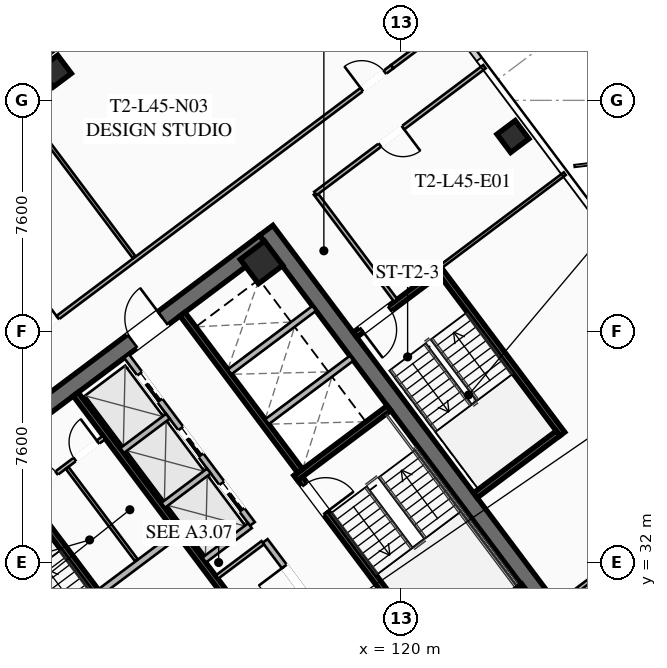
"""IFC4 building model, lengths in metres.
Left out: names, types, materials, properties, quantities, classifications, styles, units other than length and angle.
Written with IfcOpenShell. Run it as: python <this file> out.ifc"""

import sys

from ifc_helpers import new_model, si_unit, direction, frame, frame_2d, origin, origin_2d, place, context, subcontext, project, spatial, rectangle, hollow_rectangle, extrude, element, fill, save


model = new_model("IFC4")
c1 = context("Model", 3, precision=1e-05, world=origin(), true_north=direction((0.0, 1.0)))
c2 = subcontext(c1, "Body", "Model", "MODEL_VIEW")
j1 = project(units=[si_unit("LENGTHUNIT", "METRE"), si_unit("PLANEANGLEUNIT", "RADIAN")], contexts=[c1])
p1 = place(None, origin())
s1 = spatial("IfcSite", under=j1, at=p1, CompositionType="ELEMENT")
p2 = place(p1, origin())
s2 = spatial("IfcBuilding", under=s1, at=p2, CompositionType="ELEMENT")
p3 = place(p2, frame((0.0, 0.0, 167.65)))
s3 = spatial("IfcBuildingStorey", under=s2, at=p3, CompositionType="ELEMENT", Elevation=167.65)
for number, where, z_axis, x_axis in (
    (1, (112.436, 21.077, 0.0), (0.0, 0.0, 1.0), (-0.6, 0.8, 0.0)),
    (2, (115.564, 42.923, 0.0), (0.0, 0.0, 1.0), (0.6, -0.8, 0.0)),
):
    element("IfcWall", number, at=place(p3, frame(where, z_axis=z_axis, x_axis=x_axis)), inside=s3, PredefinedType="SHEAR", context=c2, shape_type="SweptSolid", body=[
        extrude(rectangle(XDim=15.6, YDim=0.55, at=frame_2d((7.8, 0.0))), origin(), (0.0, 0.0, 1.0), 3.55),
    ])
p4 = place(p3, frame((103.461, 33.502, 0.0), z_axis=(0.0, 0.0, 1.0), x_axis=(0.799998054672, 0.600002593761, 0.0)))
e3 = element("IfcWall", 3, at=p4, inside=s3, PredefinedType="SHEAR", context=c2, shape_type="SweptSolid", body=[
    extrude(rectangle(XDim=15.06, YDim=0.55, at=frame_2d((7.53, 0.0))), origin(), (0.0, 0.0, 1.0), 3.55),
])
p5 = place(p4, frame((4.58, 0.0, 0.0)))
e4 = element("IfcOpeningElement", 4, at=p5, cuts=e3, PredefinedType="OPENING", context=c2, shape_type="SweptSolid", body=[
    extrude(rectangle(XDim=1.25, YDim=2.25, at=frame_2d((0.625, 1.125))), frame((0.0, 0.285, 0.0), z_axis=(0.0, -1.0, 0.0), x_axis=(1.0, 0.0, 0.0)), (0.0, 0.0, 1.0), 0.57),
])
p6 = place(p4, frame((9.63, 0.0, 0.0)))
e5 = element("IfcOpeningElement", 5, at=p6, cuts=e3, PredefinedType="OPENING", context=c2, shape_type="SweptSolid", body=[
    extrude(rectangle(XDim=1.25, YDim=2.25, at=frame_2d((0.625, 1.125))), frame((0.0, 0.285, 0.0), z_axis=(0.0, -1.0, 0.0), x_axis=(1.0, 0.0, 0.0)), (0.0, 0.0, 1.0), 0.57),
])
for number, where, z_axis, x_axis in (
    (6, (123.87, 30.59, 0.0), (0.0, 0.0, 1.0), (0.8, 0.6, 0.0)),
    (7, (115.41, 41.87, 0.0), (0.0, 0.0, 1.0), (0.8, 0.6, 0.0)),
):
    element("IfcColumn", number, at=place(p3, frame(where, z_axis=z_axis, x_axis=x_axis)), inside=s3, PredefinedType="COLUMN", context=c2, shape_type="SweptSolid", body=[
        extrude(hollow_rectangle(XDim=1.0, YDim=1.0, WallThickness=0.04, at=origin_2d()), origin(), (0.0, 0.0, 1.0), 3.37),
    ])
for number, where, z_axis, x_axis in (
    (8, (123.68, 46.01, 0.0), (0.0, 0.0, 1.0), (0.8, 0.6, 0.0)),
    (9, (108.63, 48.16, 0.0), (0.0, 0.0, 1.0), (0.8, 0.6, 0.0)),
):
    element("IfcColumn", number, at=place(p3, frame(where, z_axis=z_axis, x_axis=x_axis)), inside=s3, PredefinedType="COLUMN", context=c2, shape_type="SweptSolid", body=[
        extrude(hollow_rectangle(XDim=0.75, YDim=0.75, WallThickness=0.032, at=origin_2d()), origin(), (0.0, 0.0, 1.0), 3.37),
    ])
p7 = place(p3, frame((111.44, 29.08, 0.0), z_axis=(0.0, 0.0, 1.0), x_axis=(-0.59999029481, 0.8000072788, 0.0)))
e10 = element("IfcWall", 10, at=p7, inside=s3, PredefinedType="SHEAR", context=c2, shape_type="SweptSolid", body=[
    extrude(rectangle(XDim=8.05, YDim=0.2, at=frame_2d((4.025, 0.0))), origin(), (0.0, 0.0, 1.0), 3.37),
])
p8 = place(p7, frame((0.45, 0.0, 0.0)))
e11 = element("IfcOpeningElement", 11, at=p8, cuts=e10, PredefinedType="OPENING", context=c2, shape_type="SweptSolid", body=[
    extrude(rectangle(XDim=1.15, YDim=2.2, at=frame_2d((0.575, 1.1))), frame((0.0, 0.11, 0.0), z_axis=(0.0, -1.0, 0.0), x_axis=(1.0, 0.0, 0.0)), (0.0, 0.0, 1.0), 0.22),
])
p9 = place(p3, frame((116.56, 34.92, 0.0), z_axis=(0.0, 0.0, 1.0), x_axis=(0.59999029481, -0.8000072788, 0.0)))
e12 = element("IfcWall", 12, at=p9, inside=s3, PredefinedType="SHEAR", context=c2, shape_type="SweptSolid", body=[
    extrude(rectangle(XDim=8.05, YDim=0.2, at=frame_2d((4.025, 0.0))), origin(), (0.0, 0.0, 1.0), 3.37),
])
p10 = place(p9, frame((0.45, 0.0, 0.0)))
e13 = element("IfcOpeningElement", 13, at=p10, cuts=e12, PredefinedType="OPENING", context=c2, shape_type="SweptSolid", body=[
    extrude(rectangle(XDim=1.15, YDim=2.2, at=frame_2d((0.575, 1.1))), frame((0.0, 0.11, 0.0), z_axis=(0.0, -1.0, 0.0), x_axis=(1.0, 0.0, 0.0)), (0.0, 0.0, 1.0), 0.22),
])
for number, where, z_axis, x_axis in (
    (14, (116.54, 34.78, 0.0), (0.0, 0.0, 1.0), (0.8, 0.6, 0.0)),
    (15, (120.98, 28.86, 0.0), (0.0, 0.0, 1.0), (0.8, 0.6, 0.0)),
):
    element("IfcWall", number, at=place(p3, frame(where, z_axis=z_axis, x_axis=x_axis)), inside=s3, PredefinedType="SHEAR", context=c2, shape_type="SweptSolid", body=[
        extrude(rectangle(XDim=3.83, YDim=0.2, at=frame_2d((1.915, 0.0))), origin(), (0.0, 0.0, 1.0), 3.37),
    ])
p11 = place(p3, frame((117.998, 25.936, 0.0), z_axis=(0.0, 0.0, 1.0), x_axis=(-0.600002693989, 0.799997979501, 0.0)))
e16 = element("IfcWall", 16, at=p11, inside=s3, PredefinedType="SHEAR", context=c2, shape_type="SweptSolid", body=[
    extrude(rectangle(XDim=14.5, YDim=0.2, at=frame_2d((7.25, 0.0))), origin(), (0.0, 0.0, 1.0), 3.37),
])
p12 = place(p3, frame((110.104, 31.028, 0.0), z_axis=(0.0, 0.0, 1.0), x_axis=(0.800018601094, 0.59997519774, 0.0)))
e17 = element("IfcWall", 17, at=p12, inside=s3, PredefinedType="SOLIDWALL", context=c2, shape_type="SweptSolid", body=[
    extrude(rectangle(XDim=3.15, YDim=0.22, at=frame_2d((1.575, 0.0))), origin(), (0.0, 0.0, 1.0), 2.723),
])
p13 = place(p3, frame((112.81, 40.17, 0.0), z_axis=(0.0, 0.0, 1.0), x_axis=(0.599993943644, -0.800004542231, 0.0)))
e18 = element("IfcWall", 18, at=p13, inside=s3, PredefinedType="SHEAR", context=c2, shape_type="SweptSolid", body=[
    extrude(rectangle(XDim=6.45, YDim=0.2, at=frame_2d((3.225, 0.0))), origin(), (0.0, 0.0, 1.0), 3.37),
])
for number, where, z_axis, x_axis in (
    (19, (115.59, 36.63, 0.0), (0.0, 0.0, 1.0), (0.8, 0.6, 0.0)),
    (20, (114.36, 38.27, 0.0), (0.0, 0.0, 1.0), (0.8, 0.6, 0.0)),
):
    element("IfcWall", number, at=place(p3, frame(where, z_axis=z_axis, x_axis=x_axis)), inside=s3, PredefinedType="SOLIDWALL", context=c2, shape_type="SweptSolid", body=[
        extrude(rectangle(XDim=3.48, YDim=0.2, at=frame_2d((1.74, 0.0))), origin(), (0.0, 0.0, 1.0), 3.37),
    ])
p14 = place(p3, frame((107.71, 34.22, 0.0), z_axis=(0.0, 0.0, 1.0), x_axis=(0.799981399002, 0.60002480053, 0.0)))
e21 = element("IfcWall", 21, at=p14, inside=s3, PredefinedType="PARTITIONING", context=c2, shape_type="SweptSolid", body=[
    extrude(rectangle(XDim=3.15, YDim=0.135, at=frame_2d((1.575, 0.0))), origin(), (0.0, 0.0, 1.0), 2.723),
])
p15 = place(p14, frame((0.25, 0.0, 0.0)))
e22 = element("IfcOpeningElement", 22, at=p15, cuts=e21, PredefinedType="OPENING", context=c2, shape_type="SweptSolid", body=[
    extrude(rectangle(XDim=0.95, YDim=2.05, at=frame_2d((0.475, 1.025))), frame((0.0, 0.077, 0.0), z_axis=(0.0, -1.0, 0.0), x_axis=(1.0, 0.0, 0.0)), (0.0, 0.0, 1.0), 0.155),
])
p16 = place(p14, frame((1.95, 0.0, 0.0)))
e23 = element("IfcOpeningElement", 23, at=p16, cuts=e21, PredefinedType="OPENING", context=c2, shape_type="SweptSolid", body=[
    extrude(rectangle(XDim=0.95, YDim=2.05, at=frame_2d((0.475, 1.025))), frame((0.0, 0.077, 0.0), z_axis=(0.0, -1.0, 0.0), x_axis=(1.0, 0.0, 0.0)), (0.0, 0.0, 1.0), 0.155),
])
p17 = place(p3, frame((111.296, 32.072, 0.0), z_axis=(0.0, 0.0, 1.0), x_axis=(-0.59995887973, 0.800030838552, 0.0)))
e24 = element("IfcWall", 24, at=p17, inside=s3, PredefinedType="PARTITIONING", context=c2, shape_type="SweptSolid", body=[
    extrude(rectangle(XDim=3.8, YDim=0.11, at=frame_2d((1.9, 0.0))), origin(), (0.0, 0.0, 1.0), 2.723),
])
p18 = place(p3, frame((119.67, 27.19, 0.0), z_axis=(0.0, 0.0, 1.0), x_axis=(-0.599988677396, 0.800008491828, 0.0)))
e25 = element("IfcWall", 25, at=p18, inside=s3, PredefinedType="SOLIDWALL", context=c2, shape_type="SweptSolid", body=[
    extrude(rectangle(XDim=6.9, YDim=0.2, at=frame_2d((3.45, 0.0))), origin(), (0.0, 0.0, 1.0), 2.723),
])
p19 = place(p18, frame((0.85, 0.0, 0.0)))
e26 = element("IfcOpeningElement", 26, at=p19, cuts=e25, PredefinedType="OPENING", context=c2, shape_type="SweptSolid", body=[
    extrude(rectangle(XDim=0.95, YDim=2.05, at=frame_2d((0.475, 1.025))), frame((0.0, 0.11, 0.0), z_axis=(0.0, -1.0, 0.0), x_axis=(1.0, 0.0, 0.0)), (0.0, 0.0, 1.0), 0.22),
])
p20 = place(p18, frame((4.8, 0.0, 0.0)))
e27 = element("IfcOpeningElement", 27, at=p20, cuts=e25, PredefinedType="OPENING", context=c2, shape_type="SweptSolid", body=[
    extrude(rectangle(XDim=1.05, YDim=2.2, at=frame_2d((0.525, 1.1))), frame((0.0, 0.11, 0.0), z_axis=(0.0, -1.0, 0.0), x_axis=(1.0, 0.0, 0.0)), (0.0, 0.0, 1.0), 0.22),
])
p21 = place(p3, frame((113.946, 31.522, 0.0), z_axis=(0.0, 0.0, 1.0), x_axis=(0.8, 0.6, 0.0)))
e28 = element("IfcWall", 28, at=p21, inside=s3, PredefinedType="PARTITIONING", context=c2, shape_type="SweptSolid", body=[
    extrude(rectangle(XDim=1.88, YDim=0.135, at=frame_2d((0.94, 0.0))), origin(), (0.0, 0.0, 1.0), 2.723),
])
p22 = place(p3, frame((115.11, 33.27, 0.0), z_axis=(0.0, 0.0, 1.0), x_axis=(-0.600011322243, 0.799991508192, 0.0)))
e29 = element("IfcWall", 29, at=p22, inside=s3, PredefinedType="SOLIDWALL", context=c2, shape_type="SweptSolid", body=[
    extrude(rectangle(XDim=6.9, YDim=0.2, at=frame_2d((3.45, 0.0))), origin(), (0.0, 0.0, 1.0), 3.37),
])
p23 = place(p22, frame((0.575, 0.0, 0.0)))
e30 = element("IfcOpeningElement", 30, at=p23, cuts=e29, PredefinedType="OPENING", context=c2, shape_type="SweptSolid", body=[
    extrude(rectangle(XDim=1.1, YDim=2.2, at=frame_2d((0.55, 1.1))), frame((0.0, 0.11, 0.0), z_axis=(0.0, -1.0, 0.0), x_axis=(1.0, 0.0, 0.0)), (0.0, 0.0, 1.0), 0.22),
])
p24 = place(p22, frame((2.825, 0.0, 0.0)))
e31 = element("IfcOpeningElement", 31, at=p24, cuts=e29, PredefinedType="OPENING", context=c2, shape_type="SweptSolid", body=[
    extrude(rectangle(XDim=1.1, YDim=2.2, at=frame_2d((0.55, 1.1))), frame((0.0, 0.11, 0.0), z_axis=(0.0, -1.0, 0.0), x_axis=(1.0, 0.0, 0.0)), (0.0, 0.0, 1.0), 0.22),
])
p25 = place(p22, frame((5.075, 0.0, 0.0)))
e32 = element("IfcOpeningElement", 32, at=p25, cuts=e29, PredefinedType="OPENING", context=c2, shape_type="SweptSolid", body=[
    extrude(rectangle(XDim=1.1, YDim=2.2, at=frame_2d((0.55, 1.1))), frame((0.0, 0.11, 0.0), z_axis=(0.0, -1.0, 0.0), x_axis=(1.0, 0.0, 0.0)), (0.0, 0.0, 1.0), 0.22),
])
p26 = place(p3, frame((113.526, 32.082, 0.0), z_axis=(0.0, 0.0, 1.0), x_axis=(0.800046745961, 0.599937666993, 0.0)))
e33 = element("IfcWall", 33, at=p26, inside=s3, PredefinedType="SOLIDWALL", context=c2, shape_type="SweptSolid", body=[
    extrude(rectangle(XDim=1.88, YDim=0.2, at=frame_2d((0.94, 0.0))), origin(), (0.0, 0.0, 1.0), 3.37),
])
p27 = place(p3, frame((112.176, 33.882, 0.0), z_axis=(0.0, 0.0, 1.0), x_axis=(0.8, 0.6, 0.0)))
e34 = element("IfcWall", 34, at=p27, inside=s3, PredefinedType="SOLIDWALL", context=c2, shape_type="SweptSolid", body=[
    extrude(rectangle(XDim=1.88, YDim=0.2, at=frame_2d((0.94, 0.0))), origin(), (0.0, 0.0, 1.0), 3.37),
])
p28 = place(p3, frame((110.826, 35.682, 0.0), z_axis=(0.0, 0.0, 1.0), x_axis=(0.799984418148, 0.600020775241, 0.0)))
e35 = element("IfcWall", 35, at=p28, inside=s3, PredefinedType="SOLIDWALL", context=c2, shape_type="SweptSolid", body=[
    extrude(rectangle(XDim=1.88, YDim=0.2, at=frame_2d((0.94, 0.0))), origin(), (0.0, 0.0, 1.0), 3.37),
])
p29 = place(p3, frame((125.304, 36.228, 0.0), z_axis=(0.0, 0.0, 1.0), x_axis=(-0.59998851072, 0.800008616831, 0.0)))
e36 = element("IfcWall", 36, at=p29, inside=s3, PredefinedType="SHEAR", context=c2, shape_type="SweptSolid", body=[
    extrude(rectangle(XDim=6.8, YDim=0.2, at=frame_2d((3.4, 0.0))), origin(), (0.0, 0.0, 1.0), 3.37),
])
p30 = place(p3, frame((121.204, 41.528, 0.0), z_axis=(0.0, 0.0, 1.0), x_axis=(-0.800017232136, -0.599977023131, 0.0)))
e37 = element("IfcWall", 37, at=p30, inside=s3, PredefinedType="SHEAR", context=c2, shape_type="SweptSolid", body=[
    extrude(rectangle(XDim=3.4, YDim=0.2, at=frame_2d((1.7, 0.0))), origin(), (0.0, 0.0, 1.0), 3.37),
])
p31 = place(p30, frame((1.975, 0.0, 0.0)))
e38 = element("IfcOpeningElement", 38, at=p31, cuts=e37, PredefinedType="OPENING", context=c2, shape_type="SweptSolid", body=[
    extrude(rectangle(XDim=1.15, YDim=2.2, at=frame_2d((0.575, 1.1))), frame((0.0, 0.11, 0.0), z_axis=(0.0, -1.0, 0.0), x_axis=(1.0, 0.0, 0.0)), (0.0, 0.0, 1.0), 0.22),
])
p32 = place(p3, frame((122.444, 34.208, 0.0), z_axis=(0.0, 0.0, 1.0), x_axis=(0.79999138319, 0.600011488909, 0.0)))
e39 = element("IfcWall", 39, at=p32, inside=s3, PredefinedType="SHEAR", context=c2, shape_type="SweptSolid", body=[
    extrude(rectangle(XDim=3.4, YDim=0.2, at=frame_2d((1.7, 0.0))), origin(), (0.0, 0.0, 1.0), 3.37),
])
p33 = place(p3, frame((119.824, 40.618, 0.0), z_axis=(0.0, 0.0, 1.0), x_axis=(-0.599982243973, 0.800013316712, 0.0)))
e40 = element("IfcWall", 40, at=p33, inside=s3, PredefinedType="PARTITIONING", context=c2, shape_type="SweptSolid", body=[
    extrude(rectangle(XDim=4.4, YDim=0.135, at=frame_2d((2.2, 0.0))), origin(), (0.0, 0.0, 1.0), 2.723),
])
p34 = place(p3, frame((96.748, 31.086, 0.0), z_axis=(0.0, 0.0, 1.0), x_axis=(0.8, 0.6, 0.0)))
e41 = element("IfcWall", 41, at=p34, inside=s3, PredefinedType="PARTITIONING", context=c2, shape_type="SweptSolid", body=[
    extrude(rectangle(XDim=28.7, YDim=0.135, at=frame_2d((14.35, 0.0))), origin(), (0.0, 0.0, 1.0), 2.723),
])
p35 = place(p34, frame((0.3, 0.0, 0.0)))
e42 = element("IfcOpeningElement", 42, at=p35, cuts=e41, PredefinedType="OPENING", context=c2, shape_type="SweptSolid", body=[
    extrude(rectangle(XDim=0.95, YDim=2.05, at=frame_2d((0.475, 1.025))), frame((0.0, 0.077, 0.0), z_axis=(0.0, -1.0, 0.0), x_axis=(1.0, 0.0, 0.0)), (0.0, 0.0, 1.0), 0.155),
])
p36 = place(p34, frame((13.999, 0.0, 0.0)))
e43 = element("IfcOpeningElement", 43, at=p36, cuts=e41, PredefinedType="OPENING", context=c2, shape_type="SweptSolid", body=[
    extrude(rectangle(XDim=0.95, YDim=2.05, at=frame_2d((0.475, 1.025))), frame((0.0, 0.077, 0.0), z_axis=(0.0, -1.0, 0.0), x_axis=(1.0, 0.0, 0.0)), (0.0, 0.0, 1.0), 0.155),
])
p37 = place(p34, frame((27.45, 0.0, 0.0)))
e44 = element("IfcOpeningElement", 44, at=p37, cuts=e41, PredefinedType="OPENING", context=c2, shape_type="SweptSolid", body=[
    extrude(rectangle(XDim=0.95, YDim=2.05, at=frame_2d((0.475, 1.025))), frame((0.0, 0.077, 0.0), z_axis=(0.0, -1.0, 0.0), x_axis=(1.0, 0.0, 0.0)), (0.0, 0.0, 1.0), 0.155),
])
p38 = place(p3, frame((119.708, 48.306, 0.0), z_axis=(0.0, 0.0, 1.0), x_axis=(0.800012055778, 0.599983925293, 0.0)))
e45 = element("IfcWall", 45, at=p38, inside=s3, PredefinedType="PARTITIONING", context=c2, shape_type="SweptSolid", body=[
    extrude(rectangle(XDim=2.43, YDim=0.135, at=frame_2d((1.215, 0.0))), origin(), (0.0, 0.0, 1.0), 2.723),
])
p39 = place(p3, frame((111.22, 42.04, 0.0), z_axis=(0.0, 0.0, 1.0), x_axis=(-0.6, 0.8, 0.0)))
e46 = element("IfcWall", 46, at=p39, inside=s3, PredefinedType="PARTITIONING", context=c2, shape_type="SweptSolid", body=[
    extrude(rectangle(XDim=7.08, YDim=0.11, at=frame_2d((3.54, 0.0))), origin(), (0.0, 0.0, 1.0), 2.723),
])
p40 = place(p3, frame((132.23, 31.61, 0.0), z_axis=(0.0, 0.0, 1.0), x_axis=(-0.799995916807, -0.600005444218, 0.0)))
e47 = element("IfcWall", 47, at=p40, inside=s3, PredefinedType="PARTITIONING", context=c2, shape_type="SweptSolid", body=[
    extrude(rectangle(XDim=28.7, YDim=0.135, at=frame_2d((14.35, 0.0))), origin(), (0.0, 0.0, 1.0), 2.723),
])
p41 = place(p40, frame((27.37, 0.0, 0.0)))
e48 = element("IfcOpeningElement", 48, at=p41, cuts=e47, PredefinedType="OPENING", context=c2, shape_type="SweptSolid", body=[
    extrude(rectangle(XDim=0.95, YDim=2.05, at=frame_2d((0.475, 1.025))), frame((0.0, 0.077, 0.0), z_axis=(0.0, -1.0, 0.0), x_axis=(1.0, 0.0, 0.0)), (0.0, 0.0, 1.0), 0.155),
])
p42 = place(p40, frame((13.775, 0.0, 0.0)))
e49 = element("IfcOpeningElement", 49, at=p42, cuts=e47, PredefinedType="OPENING", context=c2, shape_type="SweptSolid", body=[
    extrude(rectangle(XDim=0.95, YDim=2.05, at=frame_2d((0.475, 1.025))), frame((0.0, 0.077, 0.0), z_axis=(0.0, -1.0, 0.0), x_axis=(1.0, 0.0, 0.0)), (0.0, 0.0, 1.0), 0.155),
])
p43 = place(p40, frame((0.38, 0.0, 0.0)))
e50 = element("IfcOpeningElement", 50, at=p43, cuts=e47, PredefinedType="OPENING", context=c2, shape_type="SweptSolid", body=[
    extrude(rectangle(XDim=0.95, YDim=2.05, at=frame_2d((0.475, 1.025))), frame((0.0, 0.077, 0.0), z_axis=(0.0, -1.0, 0.0), x_axis=(1.0, 0.0, 0.0)), (0.0, 0.0, 1.0), 0.155),
])
p44 = place(p3, frame((122.744, 48.308, 0.0), z_axis=(0.0, 0.0, 1.0), x_axis=(-0.79997892247, -0.600028102345, 0.0)))
e51 = element("IfcWall", 51, at=p44, inside=s3, PredefinedType="PARTITIONING", context=c2, shape_type="SweptSolid", body=[
    extrude(rectangle(XDim=6.95, YDim=0.135, at=frame_2d((3.475, 0.0))), origin(), (0.0, 0.0, 1.0), 2.723),
])
p45 = place(p44, frame((3.35, 0.0, 0.0)))
e52 = element("IfcOpeningElement", 52, at=p45, cuts=e51, PredefinedType="OPENING", context=c2, shape_type="SweptSolid", body=[
    extrude(rectangle(XDim=0.95, YDim=2.05, at=frame_2d((0.475, 1.025))), frame((0.0, 0.077, 0.0), z_axis=(0.0, -1.0, 0.0), x_axis=(1.0, 0.0, 0.0)), (0.0, 0.0, 1.0), 0.155),
])
p46 = place(p3, frame((125.208, 30.656, 0.0), z_axis=(0.0, 0.0, 1.0), x_axis=(0.800006797429, 0.599990936654, 0.0)))
e53 = element("IfcWall", 53, at=p46, inside=s3, PredefinedType="PARTITIONING", context=c2, shape_type="SweptSolid", body=[
    extrude(rectangle(XDim=8.62, YDim=0.135, at=frame_2d((4.31, 0.0))), origin(), (0.0, 0.0, 1.0), 2.723),
])
p47 = place(p46, frame((2.045, 0.0, 0.0)))
e54 = element("IfcOpeningElement", 54, at=p47, cuts=e53, PredefinedType="OPENING", context=c2, shape_type="SweptSolid", body=[
    extrude(rectangle(XDim=0.95, YDim=2.05, at=frame_2d((0.475, 1.025))), frame((0.0, 0.077, 0.0), z_axis=(0.0, -1.0, 0.0), x_axis=(1.0, 0.0, 0.0)), (0.0, 0.0, 1.0), 0.155),
])
p48 = place(p3, frame((125.384, 44.788, 0.0), z_axis=(0.0, 0.0, 1.0), x_axis=(-0.8, -0.6, 0.0)))
e55 = element("IfcWall", 55, at=p48, inside=s3, PredefinedType="PARTITIONING", context=c2, shape_type="SweptSolid", body=[
    extrude(rectangle(XDim=5.1, YDim=0.11, at=frame_2d((2.55, 0.0))), origin(), (0.0, 0.0, 1.0), 2.723),
])
p49 = place(p3, frame((112.104, 20.928, 0.0), z_axis=(0.0, 0.0, 1.0), x_axis=(-0.599994940075, 0.800003794918, 0.0)))
e56 = element("IfcWall", 56, at=p49, inside=s3, PredefinedType="PARTITIONING", context=c2, shape_type="SweptSolid", body=[
    extrude(rectangle(XDim=15.44, YDim=0.135, at=frame_2d((7.72, 0.0))), origin(), (0.0, 0.0, 1.0), 2.723),
])
p50 = place(p6, origin())
e57 = element("IfcDoor", 57, at=p50, inside=s3, OperationType="SINGLE_SWING_RIGHT", PredefinedType="DOOR", context=c2, shape_type="SweptSolid", body=[
    extrude(rectangle(XDim=1.25, YDim=2.25, at=frame_2d((0.625, 1.125))), frame((0.0, 0.025, 0.0), z_axis=(0.0, -1.0, 0.0), x_axis=(1.0, 0.0, 0.0)), (0.0, 0.0, 1.0), 0.05),
])
fill(e5, e57)
p51 = place(p10, origin())
e58 = element("IfcDoor", 58, at=p51, inside=s3, OperationType="SINGLE_SWING_RIGHT", PredefinedType="DOOR", context=c2, shape_type="SweptSolid", body=[
    extrude(rectangle(XDim=1.15, YDim=2.2, at=frame_2d((0.575, 1.1))), frame((0.0, 0.025, 0.0), z_axis=(0.0, -1.0, 0.0), x_axis=(1.0, 0.0, 0.0)), (0.0, 0.0, 1.0), 0.05),
])
fill(e13, e58)
p52 = place(p15, origin())
e59 = element("IfcDoor", 59, at=p52, inside=s3, OperationType="SINGLE_SWING_LEFT", PredefinedType="DOOR", context=c2, shape_type="SweptSolid", body=[
    extrude(rectangle(XDim=0.95, YDim=2.05, at=frame_2d((0.475, 1.025))), frame((0.0, 0.025, 0.0), z_axis=(0.0, -1.0, 0.0), x_axis=(1.0, 0.0, 0.0)), (0.0, 0.0, 1.0), 0.05),
])
fill(e22, e59)
p53 = place(p16, origin())
e60 = element("IfcDoor", 60, at=p53, inside=s3, OperationType="SINGLE_SWING_RIGHT", PredefinedType="DOOR", context=c2, shape_type="SweptSolid", body=[
    extrude(rectangle(XDim=0.95, YDim=2.05, at=frame_2d((0.475, 1.025))), frame((0.0, 0.025, 0.0), z_axis=(0.0, -1.0, 0.0), x_axis=(1.0, 0.0, 0.0)), (0.0, 0.0, 1.0), 0.05),
])
fill(e23, e60)
p54 = place(p20, origin())
e61 = element("IfcDoor", 61, at=p54, inside=s3, OperationType="SINGLE_SWING_RIGHT", PredefinedType="DOOR", context=c2, shape_type="SweptSolid", body=[
    extrude(rectangle(XDim=1.05, YDim=2.2, at=frame_2d((0.525, 1.1))), frame((0.0, 0.025, 0.0), z_axis=(0.0, -1.0, 0.0), x_axis=(1.0, 0.0, 0.0)), (0.0, 0.0, 1.0), 0.05),
])
fill(e27, e61)
p55 = place(p31, origin())
e62 = element("IfcDoor", 62, at=p55, inside=s3, OperationType="SINGLE_SWING_RIGHT", PredefinedType="DOOR", context=c2, shape_type="SweptSolid", body=[
    extrude(rectangle(XDim=1.15, YDim=2.2, at=frame_2d((0.575, 1.1))), frame((0.0, 0.025, 0.0), z_axis=(0.0, -1.0, 0.0), x_axis=(1.0, 0.0, 0.0)), (0.0, 0.0, 1.0), 0.05),
])
fill(e38, e62)
p56 = place(p36, origin())
e63 = element("IfcDoor", 63, at=p56, inside=s3, OperationType="SINGLE_SWING_RIGHT", PredefinedType="DOOR", context=c2, shape_type="SweptSolid", body=[
    extrude(rectangle(XDim=0.95, YDim=2.05, at=frame_2d((0.475, 1.025))), frame((0.0, 0.025, 0.0), z_axis=(0.0, -1.0, 0.0), x_axis=(1.0, 0.0, 0.0)), (0.0, 0.0, 1.0), 0.05),
])
fill(e43, e63)
p57 = place(p37, origin())
e64 = element("IfcDoor", 64, at=p57, inside=s3, OperationType="SINGLE_SWING_LEFT", PredefinedType="DOOR", context=c2, shape_type="SweptSolid", body=[
    extrude(rectangle(XDim=0.95, YDim=2.05, at=frame_2d((0.475, 1.025))), frame((0.0, 0.025, 0.0), z_axis=(0.0, -1.0, 0.0), x_axis=(1.0, 0.0, 0.0)), (0.0, 0.0, 1.0), 0.05),
])
fill(e44, e64)
p58 = place(p45, origin())
e65 = element("IfcDoor", 65, at=p58, inside=s3, OperationType="SINGLE_SWING_LEFT", PredefinedType="DOOR", context=c2, shape_type="SweptSolid", body=[
    extrude(rectangle(XDim=0.95, YDim=2.05, at=frame_2d((0.475, 1.025))), frame((0.0, 0.025, 0.0), z_axis=(0.0, -1.0, 0.0), x_axis=(1.0, 0.0, 0.0)), (0.0, 0.0, 1.0), 0.05),
])
fill(e52, e65)
p59 = place(p23, origin())
e66 = element("IfcDoor", 66, at=p59, inside=s3, OperationType="SLIDING_TO_LEFT", PredefinedType="DOOR", context=c2, shape_type="SweptSolid", body=[
    extrude(rectangle(XDim=1.1, YDim=2.2, at=frame_2d((0.55, 1.1))), frame((0.0, 0.025, 0.0), z_axis=(0.0, -1.0, 0.0), x_axis=(1.0, 0.0, 0.0)), (0.0, 0.0, 1.0), 0.05),
])
fill(e30, e66)
p60 = place(p24, origin())
e67 = element("IfcDoor", 67, at=p60, inside=s3, OperationType="SLIDING_TO_LEFT", PredefinedType="DOOR", context=c2, shape_type="SweptSolid", body=[
    extrude(rectangle(XDim=1.1, YDim=2.2, at=frame_2d((0.55, 1.1))), frame((0.0, 0.025, 0.0), z_axis=(0.0, -1.0, 0.0), x_axis=(1.0, 0.0, 0.0)), (0.0, 0.0, 1.0), 0.05),
])
fill(e31, e67)
p61 = place(p25, origin())
e68 = element("IfcDoor", 68, at=p61, inside=s3, OperationType="SLIDING_TO_LEFT", PredefinedType="DOOR", context=c2, shape_type="SweptSolid", body=[
    extrude(rectangle(XDim=1.1, YDim=2.2, at=frame_2d((0.55, 1.1))), frame((0.0, 0.025, 0.0), z_axis=(0.0, -1.0, 0.0), x_axis=(1.0, 0.0, 0.0)), (0.0, 0.0, 1.0), 0.05),
])
fill(e32, e68)
save(model, sys.argv[1])
